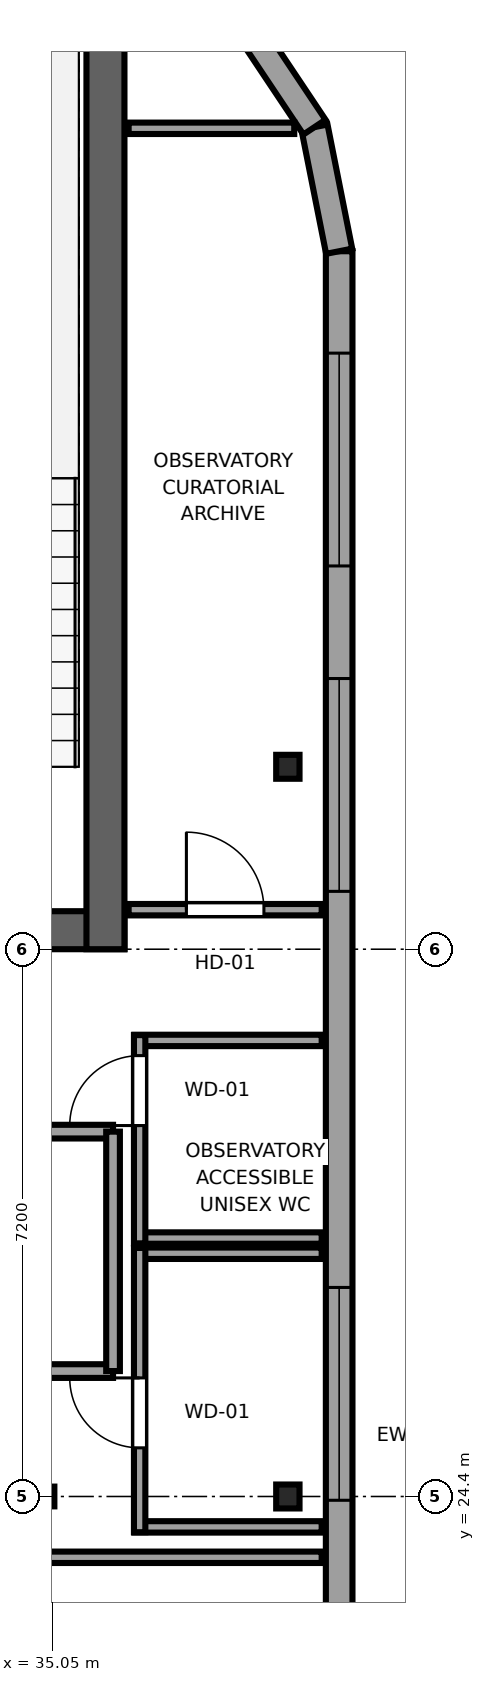
"""IFC4 building model, lengths in metres.
Left out: names, types, materials, properties, quantities, classifications, styles, units other than length and angle.
Written with IfcOpenShell. Run it as: python <this file> out.ifc"""

import sys

from ifc_helpers import new_model, si_unit, direction, frame, frame_2d, origin, origin_2d, place, context, subcontext, project, spatial, rectangle, i_section, extrude, source, transform, mapped, element, fill, save


model = new_model("IFC4")
c1 = context("Model", 3, precision=1e-05, world=origin(), true_north=direction((0.0, 1.0)))
c2 = subcontext(c1, "Body", "Model", "MODEL_VIEW")
j1 = project(units=[si_unit("LENGTHUNIT", "METRE"), si_unit("PLANEANGLEUNIT", "RADIAN")], contexts=[c1])
p1 = place(None, origin())
s1 = spatial("IfcSite", under=j1, at=p1, CompositionType="ELEMENT")
p2 = place(p1, origin())
s2 = spatial("IfcBuilding", under=s1, at=p2, CompositionType="ELEMENT")
p3 = place(p2, frame((0.0, 0.0, 282.15)))
s3 = spatial("IfcBuildingStorey", under=s2, at=p3, CompositionType="ELEMENT", Elevation=282.15)
p4 = place(p3, frame((10.0, 31.85, 0.0), z_axis=(0.0, 0.0, 1.0), x_axis=(1.0, 0.0, 0.0)))
e1 = element("IfcWall", 1, at=p4, inside=s3, PredefinedType="SHEAR", context=c2, shape_type="SweptSolid", body=[
    extrude(rectangle(XDim=26.0, YDim=0.5, at=frame_2d((13.0, 0.0))), origin(), (0.0, 0.0, 1.0), 4.4),
])
p5 = place(p4, frame((7.45, 0.0, 0.0), z_axis=(0.0, 0.0, 1.0), x_axis=(-1.0, 0.0, 0.0)))
e2 = element("IfcOpeningElement", 2, at=p5, cuts=e1, PredefinedType="OPENING", context=c2, shape_type="SweptSolid", body=[
    extrude(rectangle(XDim=1.5, YDim=2.04, at=frame_2d((0.75, 1.02))), frame((0.0, 0.26, 0.0), z_axis=(0.0, -1.0, 0.0), x_axis=(1.0, 0.0, 0.0)), (0.0, 0.0, 1.0), 0.52),
])
p6 = place(p4, frame((13.75, 0.0, 0.0), z_axis=(0.0, 0.0, 1.0), x_axis=(-1.0, 0.0, 0.0)))
e3 = element("IfcOpeningElement", 3, at=p6, cuts=e1, PredefinedType="OPENING", context=c2, shape_type="SweptSolid", body=[
    extrude(rectangle(XDim=1.5, YDim=2.04, at=frame_2d((0.75, 1.02))), frame((0.0, 0.26, 0.0), z_axis=(0.0, -1.0, 0.0), x_axis=(1.0, 0.0, 0.0)), (0.0, 0.0, 1.0), 0.52),
])
p7 = place(p4, frame((20.05, 0.0, 0.0), z_axis=(0.0, 0.0, 1.0), x_axis=(-1.0, 0.0, 0.0)))
e4 = element("IfcOpeningElement", 4, at=p7, cuts=e1, PredefinedType="OPENING", context=c2, shape_type="SweptSolid", body=[
    extrude(rectangle(XDim=1.5, YDim=2.04, at=frame_2d((0.75, 1.02))), frame((0.0, 0.26, 0.0), z_axis=(0.0, -1.0, 0.0), x_axis=(1.0, 0.0, 0.0)), (0.0, 0.0, 1.0), 0.52),
])
p8 = place(p3, frame((35.75, 31.6, 0.0), z_axis=(0.0, 0.0, 1.0), x_axis=(0.0, 1.0, 0.0)))
e5 = element("IfcWall", 5, at=p8, inside=s3, PredefinedType="SHEAR", context=c2, shape_type="SweptSolid", body=[
    extrude(rectangle(XDim=13.6, YDim=0.5, at=frame_2d((6.8, 0.0))), origin(), (0.0, 0.0, 1.0), 4.4),
])
m1 = source(origin(), c2, "Body", "SweptSolid", [
    extrude(i_section(OverallWidth=0.256, OverallDepth=0.26, WebThickness=0.01, FlangeThickness=0.017, FilletRadius=0.014, at=origin_2d()), origin(), (0.0, 0.0, 1.0), 4.4),
])
p9 = place(p3, frame((34.95, 24.4, 0.0), z_axis=(0.0, 0.0, 1.0), x_axis=(1.0, 0.0, 0.0)))
e6 = element("IfcColumn", 6, at=p9, inside=s3, PredefinedType="COLUMN", context=c2, shape_type="MappedRepresentation", body=[
    mapped(m1, transform((0.0, 0.0, 0.0), x_axis=(1.0, 0.0, 0.0), y_axis=(0.0, 1.0, 0.0), z_axis=(0.0, 0.0, 1.0), scale=1.0)),
])
m2 = source(origin(), c2, "Body", "SweptSolid", [
    extrude(i_section(OverallWidth=0.307, OverallDepth=0.315, WebThickness=0.012, FlangeThickness=0.019, FilletRadius=0.017, at=origin_2d()), origin(), (0.0, 0.0, 1.0), 4.4),
])
for number, where, z_axis, x_axis in (
    (7, (38.15, 24.4, 0.0), (0.0, 0.0, 1.0), (1.0, 0.0, 0.0)),
    (8, (38.15, 34.0, 0.0), (0.0, 0.0, 1.0), (1.0, 0.0, 0.0)),
):
    element("IfcColumn", number, at=place(p3, frame(where, z_axis=z_axis, x_axis=x_axis)), inside=s3, PredefinedType="COLUMN", context=c2, shape_type="MappedRepresentation", body=[
        mapped(m2, transform((0.0, 0.0, 0.0), x_axis=(1.0, 0.0, 0.0), y_axis=(0.0, 1.0, 0.0), z_axis=(0.0, 0.0, 1.0), scale=1.0)),
    ])
p10 = place(p3, frame((38.825, 9.617, 0.0), z_axis=(0.0, 0.0, 1.0), x_axis=(0.0, 1.0, 0.0)))
e9 = element("IfcWall", 9, at=p10, inside=s3, PredefinedType="SOLIDWALL", context=c2, shape_type="SweptSolid", body=[
    extrude(rectangle(XDim=31.166, YDim=0.35, at=frame_2d((15.583, 0.0))), origin(), (0.0, 0.0, 1.0), 4.18),
])
p11 = place(p10, frame((1.34, 0.0, 0.62)))
e10 = element("IfcOpeningElement", 10, at=p11, cuts=e9, PredefinedType="OPENING", context=c2, shape_type="SweptSolid", body=[
    extrude(rectangle(XDim=2.8, YDim=2.25, at=frame_2d((1.4, 1.125))), frame((0.0, 0.185, 0.0), z_axis=(0.0, -1.0, 0.0), x_axis=(1.0, 0.0, 0.0)), (0.0, 0.0, 1.0), 0.37),
])
p12 = place(p10, frame((5.621, 0.0, 0.62)))
e11 = element("IfcOpeningElement", 11, at=p12, cuts=e9, PredefinedType="OPENING", context=c2, shape_type="SweptSolid", body=[
    extrude(rectangle(XDim=2.8, YDim=2.25, at=frame_2d((1.4, 1.125))), frame((0.0, 0.185, 0.0), z_axis=(0.0, -1.0, 0.0), x_axis=(1.0, 0.0, 0.0)), (0.0, 0.0, 1.0), 0.37),
])
p13 = place(p10, frame((9.902, 0.0, 0.62)))
e12 = element("IfcOpeningElement", 12, at=p13, cuts=e9, PredefinedType="OPENING", context=c2, shape_type="SweptSolid", body=[
    extrude(rectangle(XDim=2.8, YDim=2.25, at=frame_2d((1.4, 1.125))), frame((0.0, 0.185, 0.0), z_axis=(0.0, -1.0, 0.0), x_axis=(1.0, 0.0, 0.0)), (0.0, 0.0, 1.0), 0.37),
])
p14 = place(p10, frame((14.733, 0.0, 0.62)))
e13 = element("IfcOpeningElement", 13, at=p14, cuts=e9, PredefinedType="OPENING", context=c2, shape_type="SweptSolid", body=[
    extrude(rectangle(XDim=2.8, YDim=2.25, at=frame_2d((1.4, 1.125))), frame((0.0, 0.185, 0.0), z_axis=(0.0, -1.0, 0.0), x_axis=(1.0, 0.0, 0.0)), (0.0, 0.0, 1.0), 0.37),
])
p15 = place(p10, frame((22.744, 0.0, 0.62)))
e14 = element("IfcOpeningElement", 14, at=p15, cuts=e9, PredefinedType="OPENING", context=c2, shape_type="SweptSolid", body=[
    extrude(rectangle(XDim=2.8, YDim=2.25, at=frame_2d((1.4, 1.125))), frame((0.0, 0.185, 0.0), z_axis=(0.0, -1.0, 0.0), x_axis=(1.0, 0.0, 0.0)), (0.0, 0.0, 1.0), 0.37),
])
p16 = place(p10, frame((27.025, 0.0, 0.62)))
e15 = element("IfcOpeningElement", 15, at=p16, cuts=e9, PredefinedType="OPENING", context=c2, shape_type="SweptSolid", body=[
    extrude(rectangle(XDim=2.8, YDim=2.25, at=frame_2d((1.4, 1.125))), frame((0.0, 0.185, 0.0), z_axis=(0.0, -1.0, 0.0), x_axis=(1.0, 0.0, 0.0)), (0.0, 0.0, 1.0), 0.37),
])
p17 = place(p3, frame((38.825, 40.783, 0.0), z_axis=(0.0, 0.0, 1.0), x_axis=(-0.195044345786, 0.980794424524, 0.0)))
e16 = element("IfcWall", 16, at=p17, inside=s3, PredefinedType="SOLIDWALL", context=c2, shape_type="SweptSolid", body=[
    extrude(rectangle(XDim=1.665, YDim=0.35, at=frame_2d((0.833, 0.0))), origin(), (0.0, 0.0, 1.0), 4.18),
])
p18 = place(p3, frame((38.5, 42.416, 0.0), z_axis=(0.0, 0.0, 1.0), x_axis=(-0.555520825599, 0.831502623162, 0.0)))
e17 = element("IfcWall", 17, at=p18, inside=s3, PredefinedType="SOLIDWALL", context=c2, shape_type="SweptSolid", body=[
    extrude(rectangle(XDim=1.647, YDim=0.35, at=frame_2d((0.824, 0.0))), origin(), (0.0, 0.0, 1.0), 4.18),
])
p19 = place(p3, frame((36.055, 32.12, 0.0), z_axis=(0.0, 0.0, 1.0), x_axis=(1.0, 0.0, 0.0)))
e18 = element("IfcWall", 18, at=p19, inside=s3, PredefinedType="PARTITIONING", context=c2, shape_type="SweptSolid", body=[
    extrude(rectangle(XDim=2.54, YDim=0.15, at=frame_2d((1.27, 0.0))), origin(), (0.0, 0.0, 1.0), 4.18),
])
p20 = place(p19, frame((0.76, 0.0, 0.0)))
e19 = element("IfcOpeningElement", 19, at=p20, cuts=e18, PredefinedType="OPENING", context=c2, shape_type="SweptSolid", body=[
    extrude(rectangle(XDim=1.02, YDim=2.03, at=frame_2d((0.51, 1.015))), frame((0.0, 0.085, 0.0), z_axis=(0.0, -1.0, 0.0), x_axis=(1.0, 0.0, 0.0)), (0.0, 0.0, 1.0), 0.17),
])
p21 = place(p3, frame((36.055, 42.4, 0.0), z_axis=(0.0, 0.0, 1.0), x_axis=(1.0, 0.0, 0.0)))
e20 = element("IfcWall", 20, at=p21, inside=s3, PredefinedType="PARTITIONING", context=c2, shape_type="SweptSolid", body=[
    extrude(rectangle(XDim=2.179, YDim=0.15, at=frame_2d((1.089, 0.0))), origin(), (0.0, 0.0, 1.0), 4.18),
])
p22 = place(p3, frame((27.0, 23.6, 0.0), z_axis=(0.0, 0.0, 1.0), x_axis=(1.0, 0.0, 0.0)))
e21 = element("IfcWall", 21, at=p22, inside=s3, PredefinedType="PARTITIONING", context=c2, shape_type="SweptSolid", body=[
    extrude(rectangle(XDim=11.595, YDim=0.15, at=frame_2d((5.797, 0.0))), origin(), (0.0, 0.0, 1.0), 4.18),
])
p23 = place(p22, frame((2.573, 0.0, 0.0)))
e22 = element("IfcOpeningElement", 22, at=p23, cuts=e21, PredefinedType="OPENING", context=c2, shape_type="SweptSolid", body=[
    extrude(rectangle(XDim=1.65, YDim=2.15, at=frame_2d((0.825, 1.075))), frame((0.0, 0.085, 0.0), z_axis=(0.0, -1.0, 0.0), x_axis=(1.0, 0.0, 0.0)), (0.0, 0.0, 1.0), 0.17),
])
p24 = place(p3, frame((24.3, 26.05, 0.0), z_axis=(0.0, 0.0, 1.0), x_axis=(1.0, 0.0, 0.0)))
e23 = element("IfcWall", 23, at=p24, inside=s3, PredefinedType="PARTITIONING", context=c2, shape_type="SweptSolid", body=[
    extrude(rectangle(XDim=11.55, YDim=0.18, at=frame_2d((5.775, 0.0))), origin(), (0.0, 0.0, 1.0), 4.18),
])
p25 = place(p24, frame((4.95, 0.0, 0.0)))
e24 = element("IfcOpeningElement", 24, at=p25, cuts=e23, PredefinedType="OPENING", context=c2, shape_type="SweptSolid", body=[
    extrude(rectangle(XDim=1.65, YDim=2.15, at=frame_2d((0.825, 1.075))), frame((0.0, 0.1, 0.0), z_axis=(0.0, -1.0, 0.0), x_axis=(1.0, 0.0, 0.0)), (0.0, 0.0, 1.0), 0.2),
])
p26 = place(p3, frame((24.3, 29.2, 0.0), z_axis=(0.0, 0.0, 1.0), x_axis=(1.0, 0.0, 0.0)))
e25 = element("IfcWall", 25, at=p26, inside=s3, PredefinedType="PARTITIONING", context=c2, shape_type="SweptSolid", body=[
    extrude(rectangle(XDim=11.55, YDim=0.18, at=frame_2d((5.775, 0.0))), origin(), (0.0, 0.0, 1.0), 4.18),
])
p27 = place(p3, frame((35.85, 26.05, 0.0), z_axis=(0.0, 0.0, 1.0), x_axis=(0.0, 1.0, 0.0)))
e26 = element("IfcWall", 26, at=p27, inside=s3, PredefinedType="PARTITIONING", context=c2, shape_type="SweptSolid", body=[
    extrude(rectangle(XDim=3.15, YDim=0.18, at=frame_2d((1.575, 0.0))), origin(), (0.0, 0.0, 1.0), 4.18),
])
for number, where, z_axis, x_axis in (
    (27, (36.13, 24.0, 0.0), (0.0, 0.0, 1.0), (1.0, 0.0, 0.0)),
    (28, (36.13, 27.6, 0.0), (0.0, 0.0, 1.0), (1.0, 0.0, 0.0)),
):
    element("IfcWall", number, at=place(p3, frame(where, z_axis=z_axis, x_axis=x_axis)), inside=s3, PredefinedType="PARTITIONING", context=c2, shape_type="SweptSolid", body=[
        extrude(rectangle(XDim=2.465, YDim=0.15, at=frame_2d((1.232, 0.0))), origin(), (0.0, 0.0, 1.0), 4.18),
    ])
p28 = place(p3, frame((36.2, 23.93, 0.0), z_axis=(0.0, 0.0, 1.0), x_axis=(0.0, 1.0, 0.0)))
e29 = element("IfcWall", 29, at=p28, inside=s3, PredefinedType="PARTITIONING", context=c2, shape_type="SweptSolid", body=[
    extrude(rectangle(XDim=3.74, YDim=0.15, at=frame_2d((1.87, 0.0))), origin(), (0.0, 0.0, 1.0), 4.18),
])
p29 = place(p28, frame((1.11, 0.0, 0.0)))
e30 = element("IfcOpeningElement", 30, at=p29, cuts=e29, PredefinedType="OPENING", context=c2, shape_type="SweptSolid", body=[
    extrude(rectangle(XDim=0.92, YDim=2.01, at=frame_2d((0.46, 1.005))), frame((0.0, 0.085, 0.0), z_axis=(0.0, -1.0, 0.0), x_axis=(1.0, 0.0, 0.0)), (0.0, 0.0, 1.0), 0.17),
])
for number, where, z_axis, x_axis in (
    (31, (36.13, 27.8, 0.0), (0.0, 0.0, 1.0), (1.0, 0.0, 0.0)),
    (32, (36.13, 30.4, 0.0), (0.0, 0.0, 1.0), (1.0, 0.0, 0.0)),
):
    element("IfcWall", number, at=place(p3, frame(where, z_axis=z_axis, x_axis=x_axis)), inside=s3, PredefinedType="PARTITIONING", context=c2, shape_type="SweptSolid", body=[
        extrude(rectangle(XDim=2.465, YDim=0.15, at=frame_2d((1.232, 0.0))), origin(), (0.0, 0.0, 1.0), 4.18),
    ])
p30 = place(p3, frame((36.2, 27.73, 0.0), z_axis=(0.0, 0.0, 1.0), x_axis=(0.0, 1.0, 0.0)))
e33 = element("IfcWall", 33, at=p30, inside=s3, PredefinedType="PARTITIONING", context=c2, shape_type="SweptSolid", body=[
    extrude(rectangle(XDim=2.74, YDim=0.15, at=frame_2d((1.37, 0.0))), origin(), (0.0, 0.0, 1.0), 4.18),
])
p31 = place(p30, frame((1.55, 0.0, 0.0)))
e34 = element("IfcOpeningElement", 34, at=p31, cuts=e33, PredefinedType="OPENING", context=c2, shape_type="SweptSolid", body=[
    extrude(rectangle(XDim=0.92, YDim=2.01, at=frame_2d((0.46, 1.005))), frame((0.0, 0.085, 0.0), z_axis=(0.0, -1.0, 0.0), x_axis=(1.0, 0.0, 0.0)), (0.0, 0.0, 1.0), 0.17),
])
m3 = source(origin(), c2, "Body", "SweptSolid", [
    extrude(rectangle(XDim=2.8, YDim=2.25, at=frame_2d((1.4, 1.125))), frame((0.0, 0.09, 0.0), z_axis=(0.0, -1.0, 0.0), x_axis=(1.0, 0.0, 0.0)), (0.0, 0.0, 1.0), 0.06),
])
p32 = place(p14, origin())
e35 = element("IfcWindow", 35, at=p32, inside=s3, PartitioningType="TRIPLE_PANEL_HORIZONTAL", PredefinedType="WINDOW", context=c2, shape_type="MappedRepresentation", body=[
    mapped(m3, transform((0.0, 0.0, 0.0), x_axis=(1.0, 0.0, 0.0), y_axis=(0.0, 1.0, 0.0), z_axis=(0.0, 0.0, 1.0), scale=1.0)),
])
fill(e13, e35)
p33 = place(p15, origin())
e36 = element("IfcWindow", 36, at=p33, inside=s3, PartitioningType="TRIPLE_PANEL_HORIZONTAL", PredefinedType="WINDOW", context=c2, shape_type="MappedRepresentation", body=[
    mapped(m3, transform((0.0, 0.0, 0.0), x_axis=(1.0, 0.0, 0.0), y_axis=(0.0, 1.0, 0.0), z_axis=(0.0, 0.0, 1.0), scale=1.0)),
])
fill(e14, e36)
p34 = place(p16, origin())
e37 = element("IfcWindow", 37, at=p34, inside=s3, PartitioningType="TRIPLE_PANEL_HORIZONTAL", PredefinedType="WINDOW", context=c2, shape_type="MappedRepresentation", body=[
    mapped(m3, transform((0.0, 0.0, 0.0), x_axis=(1.0, 0.0, 0.0), y_axis=(0.0, 1.0, 0.0), z_axis=(0.0, 0.0, 1.0), scale=1.0)),
])
fill(e15, e37)
m4 = source(origin(), c2, "Body", "SweptSolid", [
    extrude(rectangle(XDim=1.02, YDim=2.03, at=frame_2d((0.51, 1.015))), frame((0.0, 0.025, 0.0), z_axis=(0.0, -1.0, 0.0), x_axis=(1.0, 0.0, 0.0)), (0.0, 0.0, 1.0), 0.05),
])
p35 = place(p20, origin())
e38 = element("IfcDoor", 38, at=p35, inside=s3, OperationType="SINGLE_SWING_LEFT", PredefinedType="DOOR", context=c2, shape_type="MappedRepresentation", body=[
    mapped(m4, transform((0.0, 0.0, 0.0), x_axis=(1.0, 0.0, 0.0), y_axis=(0.0, 1.0, 0.0), z_axis=(0.0, 0.0, 1.0), scale=1.0)),
])
fill(e19, e38)
m5 = source(origin(), c2, "Body", "SweptSolid", [
    extrude(rectangle(XDim=0.92, YDim=2.01, at=frame_2d((0.46, 1.005))), frame((0.0, 0.025, 0.0), z_axis=(0.0, -1.0, 0.0), x_axis=(1.0, 0.0, 0.0)), (0.0, 0.0, 1.0), 0.05),
])
p36 = place(p29, origin())
e39 = element("IfcDoor", 39, at=p36, inside=s3, OperationType="SINGLE_SWING_RIGHT", PredefinedType="DOOR", context=c2, shape_type="MappedRepresentation", body=[
    mapped(m5, transform((0.0, 0.0, 0.0), x_axis=(1.0, 0.0, 0.0), y_axis=(0.0, 1.0, 0.0), z_axis=(0.0, 0.0, 1.0), scale=1.0)),
])
fill(e30, e39)
p37 = place(p31, origin())
e40 = element("IfcDoor", 40, at=p37, inside=s3, OperationType="SINGLE_SWING_LEFT", PredefinedType="DOOR", context=c2, shape_type="MappedRepresentation", body=[
    mapped(m5, transform((0.0, 0.0, 0.0), x_axis=(1.0, 0.0, 0.0), y_axis=(0.0, 1.0, 0.0), z_axis=(0.0, 0.0, 1.0), scale=1.0)),
])
fill(e34, e40)
save(model, sys.argv[1])
